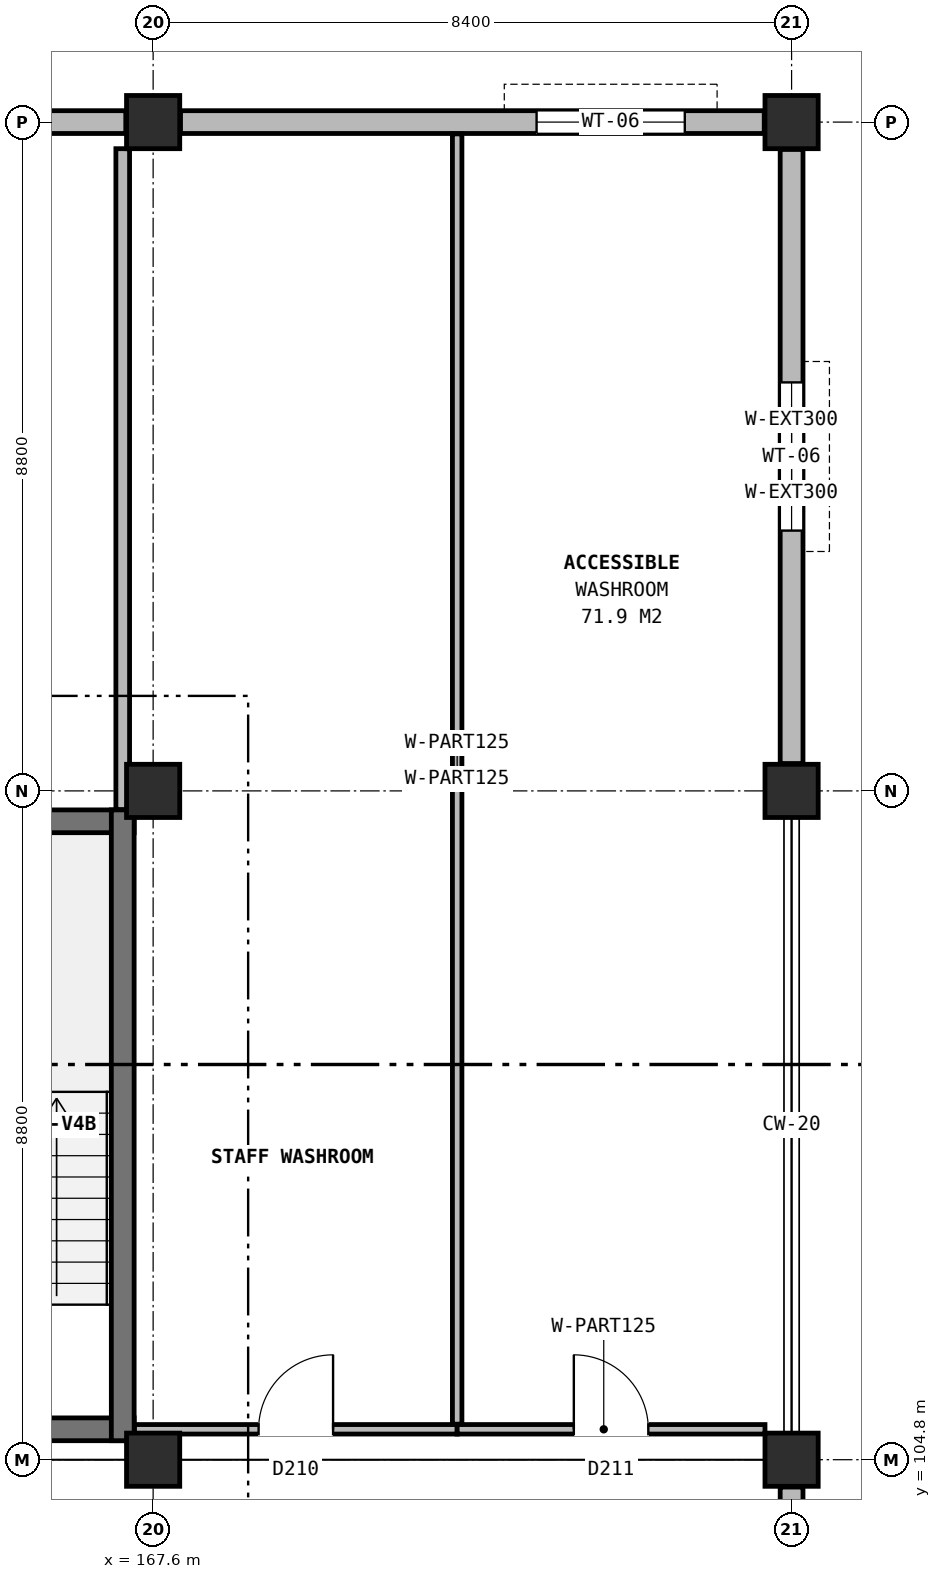
"""IFC4 building model, lengths in metres.
Left out: names, types, materials, properties, quantities, classifications, styles, units other than length and angle.
Written with IfcOpenShell. Run it as: python <this file> out.ifc"""

import sys

from ifc_helpers import new_model, si_unit, direction, frame, frame_2d, origin, origin_2d, place, context, subcontext, project, spatial, rectangle, extrude, element, fill, save


model = new_model("IFC4")
c1 = context("Model", 3, precision=1e-05, world=origin(), true_north=direction((0.0, 1.0)))
c2 = subcontext(c1, "Body", "Model", "MODEL_VIEW")
j1 = project(units=[si_unit("LENGTHUNIT", "METRE"), si_unit("PLANEANGLEUNIT", "RADIAN")], contexts=[c1])
p1 = place(None, origin())
s1 = spatial("IfcSite", under=j1, at=p1, CompositionType="ELEMENT")
p2 = place(p1, origin())
s2 = spatial("IfcBuilding", under=s1, at=p2, CompositionType="ELEMENT")
p3 = place(p2, frame((0.0, 0.0, 21.0)))
s3 = spatial("IfcBuildingStorey", under=s2, at=p3, CompositionType="ELEMENT", Elevation=21.0)
for number, where, z_axis, x_axis in (
    (1, (167.6, 104.8, 0.0), (0.0, 0.0, 1.0), (1.0, 0.0, 0.0)),
    (2, (167.6, 113.6, 0.0), (0.0, 0.0, 1.0), (1.0, 0.0, 0.0)),
    (3, (167.6, 122.4, 0.0), (0.0, 0.0, 1.0), (1.0, 0.0, 0.0)),
    (4, (176.0, 104.8, 0.0), (0.0, 0.0, 1.0), (1.0, 0.0, 0.0)),
    (5, (176.0, 113.6, 0.0), (0.0, 0.0, 1.0), (1.0, 0.0, 0.0)),
    (6, (176.0, 122.4, 0.0), (0.0, 0.0, 1.0), (1.0, 0.0, 0.0)),
):
    element("IfcColumn", number, at=place(p3, frame(where, z_axis=z_axis, x_axis=x_axis)), inside=s3, PredefinedType="COLUMN", context=c2, shape_type="SweptSolid", body=[
        extrude(rectangle(XDim=0.7, YDim=0.7, at=origin_2d()), origin(), (0.0, 0.0, 1.0), 3.8),
    ])
p4 = place(p3, frame((176.0, 96.36, 0.0), z_axis=(0.0, 0.0, 1.0), x_axis=(0.0, 1.0, 0.0)))
e7 = element("IfcWall", 7, at=p4, inside=s3, PredefinedType="SOLIDWALL", context=c2, shape_type="SweptSolid", body=[
    extrude(rectangle(XDim=8.08, YDim=0.3, at=frame_2d((4.04, 0.0))), origin(), (0.0, 0.0, 1.0), 2.95),
])
p5 = place(p4, frame((2.24, 0.0, 0.9)))
e8 = element("IfcOpeningElement", 8, at=p5, cuts=e7, PredefinedType="OPENING", context=c2, shape_type="SweptSolid", body=[
    extrude(rectangle(XDim=1.56, YDim=1.88, at=frame_2d((0.78, 0.94))), frame((0.0, 0.16, 0.0), z_axis=(0.0, -1.0, 0.0), x_axis=(1.0, 0.0, 0.0)), (0.0, 0.0, 1.0), 0.32),
])
p6 = place(p3, frame((176.0, 113.96, 0.0), z_axis=(0.0, 0.0, 1.0), x_axis=(0.0, 1.0, 0.0)))
e9 = element("IfcWall", 9, at=p6, inside=s3, PredefinedType="SOLIDWALL", context=c2, shape_type="SweptSolid", body=[
    extrude(rectangle(XDim=8.08, YDim=0.3, at=frame_2d((4.04, 0.0))), origin(), (0.0, 0.0, 1.0), 2.95),
])
p7 = place(p6, frame((3.065, 0.0, 0.9)))
e10 = element("IfcOpeningElement", 10, at=p7, cuts=e9, PredefinedType="OPENING", context=c2, shape_type="SweptSolid", body=[
    extrude(rectangle(XDim=1.95, YDim=1.9, at=frame_2d((0.975, 0.95))), frame((0.0, 0.16, 0.0), z_axis=(0.0, -1.0, 0.0), x_axis=(1.0, 0.0, 0.0)), (0.0, 0.0, 1.0), 0.32),
])
p8 = place(p3, frame((175.64, 122.4, 0.0), z_axis=(0.0, 0.0, 1.0), x_axis=(-1.0, 0.0, 0.0)))
e11 = element("IfcWall", 11, at=p8, inside=s3, PredefinedType="SOLIDWALL", context=c2, shape_type="SweptSolid", body=[
    extrude(rectangle(XDim=7.68, YDim=0.3, at=frame_2d((3.84, 0.0))), origin(), (0.0, 0.0, 1.0), 2.95),
])
p9 = place(p8, frame((1.045, 0.0, 0.9)))
e12 = element("IfcOpeningElement", 12, at=p9, cuts=e11, PredefinedType="OPENING", context=c2, shape_type="SweptSolid", body=[
    extrude(rectangle(XDim=1.95, YDim=1.9, at=frame_2d((0.975, 0.95))), frame((0.0, 0.16, 0.0), z_axis=(0.0, -1.0, 0.0), x_axis=(1.0, 0.0, 0.0)), (0.0, 0.0, 1.0), 0.32),
])
p10 = place(p3, frame((167.24, 122.4, 0.0), z_axis=(0.0, 0.0, 1.0), x_axis=(-1.0, 0.0, 0.0)))
e13 = element("IfcWall", 13, at=p10, inside=s3, PredefinedType="SOLIDWALL", context=c2, shape_type="SweptSolid", body=[
    extrude(rectangle(XDim=7.68, YDim=0.3, at=frame_2d((3.84, 0.0))), origin(), (0.0, 0.0, 1.0), 2.95),
])
p11 = place(p10, frame((2.885, 0.0, 0.9)))
e14 = element("IfcOpeningElement", 14, at=p11, cuts=e13, PredefinedType="OPENING", context=c2, shape_type="SweptSolid", body=[
    extrude(rectangle(XDim=1.95, YDim=1.9, at=frame_2d((0.975, 0.95))), frame((0.0, 0.16, 0.0), z_axis=(0.0, -1.0, 0.0), x_axis=(1.0, 0.0, 0.0)), (0.0, 0.0, 1.0), 0.32),
])
p12 = place(p3, frame((163.75, 105.2, 0.0), z_axis=(0.0, 0.0, 1.0), x_axis=(1.0, 0.0, 0.0)))
e15 = element("IfcWall", 15, at=p12, inside=s3, PredefinedType="SHEAR", context=c2, shape_type="SweptSolid", body=[
    extrude(rectangle(XDim=3.6, YDim=0.3, at=frame_2d((1.8, 0.0))), origin(), (0.0, 0.0, 1.0), 3.8),
])
p13 = place(p12, frame((1.05, 0.0, 0.0)))
e16 = element("IfcOpeningElement", 16, at=p13, cuts=e15, PredefinedType="OPENING", context=c2, shape_type="SweptSolid", body=[
    extrude(rectangle(XDim=1.1, YDim=2.2, at=frame_2d((0.55, 1.1))), frame((0.0, 0.16, 0.0), z_axis=(0.0, -1.0, 0.0), x_axis=(1.0, 0.0, 0.0)), (0.0, 0.0, 1.0), 0.32),
])
p14 = place(p3, frame((163.75, 113.2, 0.0), z_axis=(0.0, 0.0, 1.0), x_axis=(1.0, 0.0, 0.0)))
e17 = element("IfcWall", 17, at=p14, inside=s3, PredefinedType="SHEAR", context=c2, shape_type="SweptSolid", body=[
    extrude(rectangle(XDim=3.6, YDim=0.3, at=frame_2d((1.8, 0.0))), origin(), (0.0, 0.0, 1.0), 3.8),
])
p15 = place(p3, frame((167.2, 105.05, 0.0), z_axis=(0.0, 0.0, 1.0), x_axis=(0.0, 1.0, 0.0)))
e18 = element("IfcWall", 18, at=p15, inside=s3, PredefinedType="SHEAR", context=c2, shape_type="SweptSolid", body=[
    extrude(rectangle(XDim=8.3, YDim=0.3, at=frame_2d((4.15, 0.0))), origin(), (0.0, 0.0, 1.0), 3.8),
])
p16 = place(p3, frame((167.355, 105.2, 0.0), z_axis=(0.0, 0.0, 1.0), x_axis=(1.0, 0.0, 0.0)))
e19 = element("IfcWall", 19, at=p16, inside=s3, PredefinedType="PARTITIONING", context=c2, shape_type="SweptSolid", body=[
    extrude(rectangle(XDim=4.245, YDim=0.125, at=frame_2d((2.123, 0.0))), origin(), (0.0, 0.0, 1.0), 2.945),
])
p17 = place(p16, frame((1.633, 0.0, 0.0)))
e20 = element("IfcOpeningElement", 20, at=p17, cuts=e19, PredefinedType="OPENING", context=c2, shape_type="SweptSolid", body=[
    extrude(rectangle(XDim=0.98, YDim=2.1, at=frame_2d((0.49, 1.05))), frame((0.0, 0.073, 0.0), z_axis=(0.0, -1.0, 0.0), x_axis=(1.0, 0.0, 0.0)), (0.0, 0.0, 1.0), 0.145),
])
p18 = place(p3, frame((171.6, 105.2, 0.0), z_axis=(0.0, 0.0, 1.0), x_axis=(1.0, 0.0, 0.0)))
e21 = element("IfcWall", 21, at=p18, inside=s3, PredefinedType="PARTITIONING", context=c2, shape_type="SweptSolid", body=[
    extrude(rectangle(XDim=4.05, YDim=0.125, at=frame_2d((2.025, 0.0))), origin(), (0.0, 0.0, 1.0), 2.945),
])
p19 = place(p18, frame((1.535, 0.0, 0.0)))
e22 = element("IfcOpeningElement", 22, at=p19, cuts=e21, PredefinedType="OPENING", context=c2, shape_type="SweptSolid", body=[
    extrude(rectangle(XDim=0.98, YDim=2.1, at=frame_2d((0.49, 1.05))), frame((0.0, 0.073, 0.0), z_axis=(0.0, -1.0, 0.0), x_axis=(1.0, 0.0, 0.0)), (0.0, 0.0, 1.0), 0.145),
])
p20 = place(p3, frame((167.2, 113.355, 0.0), z_axis=(0.0, 0.0, 1.0), x_axis=(0.0, 1.0, 0.0)))
e23 = element("IfcWall", 23, at=p20, inside=s3, PredefinedType="PARTITIONING", context=c2, shape_type="SweptSolid", body=[
    extrude(rectangle(XDim=8.695, YDim=0.18, at=frame_2d((4.348, 0.0))), origin(), (0.0, 0.0, 1.0), 2.945),
])
p21 = place(p3, frame((171.6, 105.268, 0.0), z_axis=(0.0, 0.0, 1.0), x_axis=(0.0, 1.0, 0.0)))
e24 = element("IfcWall", 24, at=p21, inside=s3, PredefinedType="PARTITIONING", context=c2, shape_type="SweptSolid", body=[
    extrude(rectangle(XDim=16.978, YDim=0.125, at=frame_2d((8.489, 0.0))), origin(), (0.0, 0.0, 1.0), 3.465),
])
p22 = place(p7, origin())
e25 = element("IfcWindow", 25, at=p22, inside=s3, PartitioningType="SINGLE_PANEL", PredefinedType="WINDOW", context=c2, shape_type="SweptSolid", body=[
    extrude(rectangle(XDim=1.95, YDim=1.9, at=frame_2d((0.975, 0.95))), frame((0.0, 0.03, 0.0), z_axis=(0.0, -1.0, 0.0), x_axis=(1.0, 0.0, 0.0)), (0.0, 0.0, 1.0), 0.06),
])
fill(e10, e25)
p23 = place(p9, origin())
e26 = element("IfcWindow", 26, at=p23, inside=s3, PartitioningType="SINGLE_PANEL", PredefinedType="WINDOW", context=c2, shape_type="SweptSolid", body=[
    extrude(rectangle(XDim=1.95, YDim=1.9, at=frame_2d((0.975, 0.95))), frame((0.0, 0.03, 0.0), z_axis=(0.0, -1.0, 0.0), x_axis=(1.0, 0.0, 0.0)), (0.0, 0.0, 1.0), 0.06),
])
fill(e12, e26)
p24 = place(p17, origin())
e27 = element("IfcDoor", 27, at=p24, inside=s3, OperationType="SINGLE_SWING_RIGHT", PredefinedType="DOOR", context=c2, shape_type="SweptSolid", body=[
    extrude(rectangle(XDim=0.98, YDim=2.1, at=frame_2d((0.49, 1.05))), frame((0.0, 0.025, 0.0), z_axis=(0.0, -1.0, 0.0), x_axis=(1.0, 0.0, 0.0)), (0.0, 0.0, 1.0), 0.05),
])
fill(e20, e27)
p25 = place(p19, origin())
e28 = element("IfcDoor", 28, at=p25, inside=s3, OperationType="SINGLE_SWING_LEFT", PredefinedType="DOOR", context=c2, shape_type="SweptSolid", body=[
    extrude(rectangle(XDim=0.98, YDim=2.1, at=frame_2d((0.49, 1.05))), frame((0.0, 0.025, 0.0), z_axis=(0.0, -1.0, 0.0), x_axis=(1.0, 0.0, 0.0)), (0.0, 0.0, 1.0), 0.05),
])
fill(e22, e28)
save(model, sys.argv[1])
